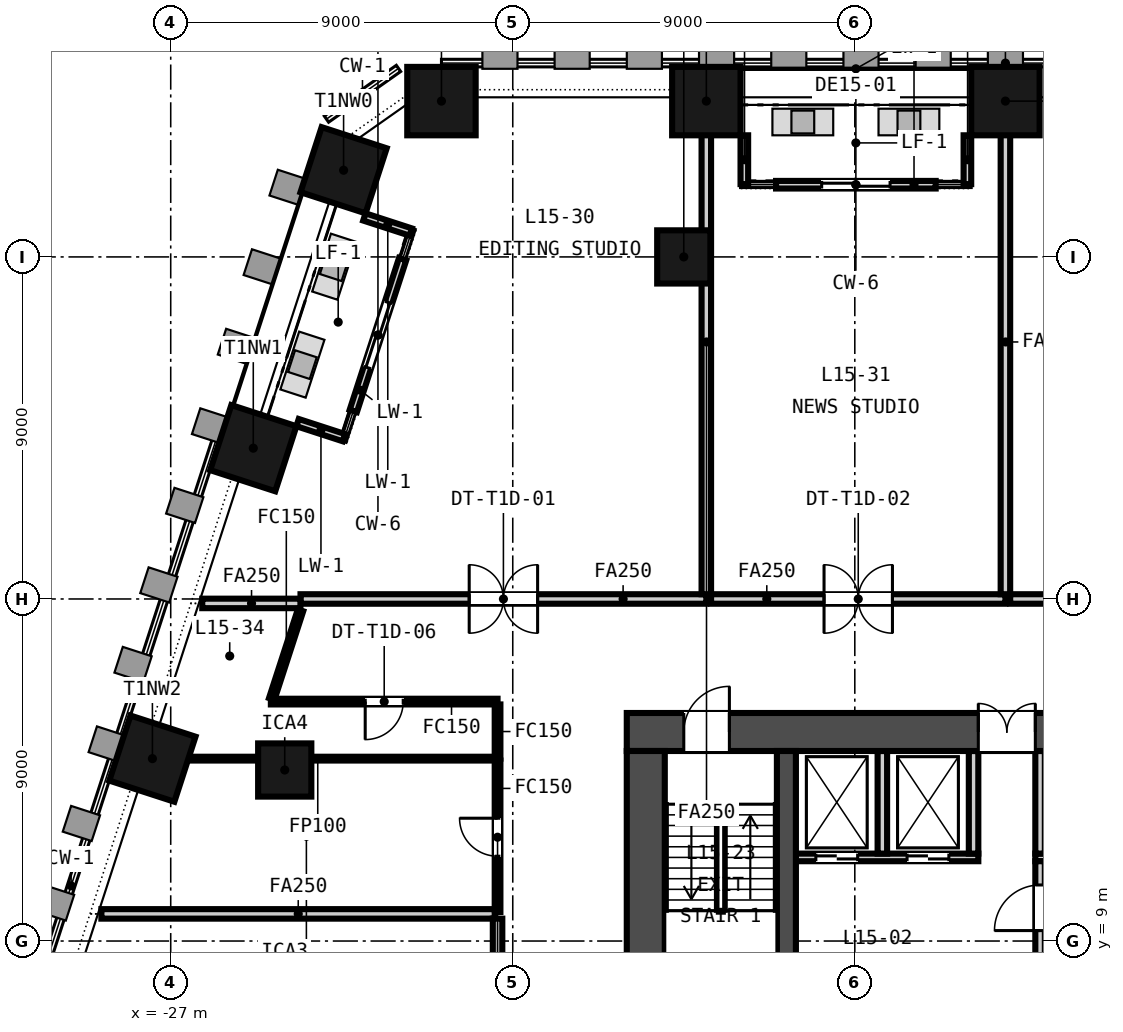
"""IFC4 building model, lengths in metres.
Left out: names, types, materials, properties, quantities, classifications, styles, units other than length and angle.
Written with IfcOpenShell. Run it as: python <this file> out.ifc"""

import sys

from ifc_helpers import new_model, si_unit, direction, frame, frame_2d, origin, origin_2d, place, context, subcontext, project, spatial, rectangle, extrude, element, fill, save


model = new_model("IFC4")
c1 = context("Model", 3, precision=1e-05, world=origin(), true_north=direction((0.0, 1.0)))
c2 = subcontext(c1, "Body", "Model", "MODEL_VIEW")
j1 = project(units=[si_unit("LENGTHUNIT", "METRE"), si_unit("PLANEANGLEUNIT", "RADIAN")], contexts=[c1])
p1 = place(None, origin())
s1 = spatial("IfcSite", under=j1, at=p1, CompositionType="ELEMENT")
p2 = place(p1, origin())
s2 = spatial("IfcBuilding", under=s1, at=p2, CompositionType="ELEMENT")
p3 = place(p2, frame((0.0, 0.0, 68.85)))
s3 = spatial("IfcBuildingStorey", under=s2, at=p3, CompositionType="ELEMENT", Elevation=68.85)
p4 = place(p3, frame((-15.0, 14.5, -0.15), z_axis=(0.0, 0.0, 1.0), x_axis=(1.0, 0.0, 0.0)))
e1 = element("IfcWall", 1, at=p4, inside=s3, PredefinedType="SOLIDWALL", context=c2, shape_type="SweptSolid", body=[
    extrude(rectangle(XDim=30.0, YDim=1.0, at=frame_2d((15.0, 0.0))), origin(), (0.0, 0.0, 1.0), 3.65),
])
p5 = place(p4, frame((9.25, 0.0, 0.15)))
e2 = element("IfcOpeningElement", 2, at=p5, cuts=e1, PredefinedType="OPENING", context=c2, shape_type="SweptSolid", body=[
    extrude(rectangle(XDim=1.5, YDim=2.1, at=frame_2d((0.75, 1.05))), frame((0.0, 0.51, 0.0), z_axis=(0.0, -1.0, 0.0), x_axis=(1.0, 0.0, 0.0)), (0.0, 0.0, 1.0), 1.02),
])
p6 = place(p4, frame((19.4, 0.0, 0.15)))
e3 = element("IfcOpeningElement", 3, at=p6, cuts=e1, PredefinedType="OPENING", context=c2, shape_type="SweptSolid", body=[
    extrude(rectangle(XDim=1.5, YDim=2.1, at=frame_2d((0.75, 1.05))), frame((0.0, 0.51, 0.0), z_axis=(0.0, -1.0, 0.0), x_axis=(1.0, 0.0, 0.0)), (0.0, 0.0, 1.0), 1.02),
])
p7 = place(p4, frame((1.5, 0.0, 0.15)))
e4 = element("IfcOpeningElement", 4, at=p7, cuts=e1, PredefinedType="OPENING", context=c2, shape_type="SweptSolid", body=[
    extrude(rectangle(XDim=1.2, YDim=2.1, at=frame_2d((0.6, 1.05))), frame((0.0, 0.51, 0.0), z_axis=(0.0, -1.0, 0.0), x_axis=(1.0, 0.0, 0.0)), (0.0, 0.0, 1.0), 1.02),
])
p8 = place(p4, frame((27.3, 0.0, 0.15)))
e5 = element("IfcOpeningElement", 5, at=p8, cuts=e1, PredefinedType="OPENING", context=c2, shape_type="SweptSolid", body=[
    extrude(rectangle(XDim=1.2, YDim=2.1, at=frame_2d((0.6, 1.05))), frame((0.0, 0.51, 0.0), z_axis=(0.0, -1.0, 0.0), x_axis=(1.0, 0.0, 0.0)), (0.0, 0.0, 1.0), 1.02),
])
p9 = place(p3, frame((-14.5, 1.0, -0.15), z_axis=(0.0, 0.0, 1.0), x_axis=(0.0, 1.0, 0.0)))
e6 = element("IfcWall", 6, at=p9, inside=s3, PredefinedType="SOLIDWALL", context=c2, shape_type="SweptSolid", body=[
    extrude(rectangle(XDim=13.0, YDim=1.0, at=frame_2d((6.5, 0.0))), origin(), (0.0, 0.0, 1.0), 3.65),
])
p10 = place(p3, frame((-10.8, 1.0, -0.15), z_axis=(0.0, 0.0, 1.0), x_axis=(0.0, 1.0, 0.0)))
e7 = element("IfcWall", 7, at=p10, inside=s3, PredefinedType="SOLIDWALL", context=c2, shape_type="SweptSolid", body=[
    extrude(rectangle(XDim=13.0, YDim=0.5, at=frame_2d((6.5, 0.0))), origin(), (0.0, 0.0, 1.0), 3.65),
])
for number, where, z_axis, x_axis in (
    (8, (-5.037, 31.1, -0.15), (0.0, 0.0, 1.0), (-1.0, 0.0, 0.0)),
    (9, (-12.907, 31.1, -0.15), (0.0, 0.0, 1.0), (-1.0, 0.0, 0.0)),
    (10, (-19.876, 31.1, -0.15), (0.0, 0.0, 1.0), (-1.0, 0.0, 0.0)),
    (11, (-22.451, 29.281, -0.15), (0.0, 0.0, 1.0), (-0.309, -0.951, 0.0)),
    (12, (-24.827, 21.968, -0.15), (0.0, 0.0, 1.0), (-0.309, -0.951, 0.0)),
    (13, (-27.482, 13.799, -0.15), (0.0, 0.0, 1.0), (-0.309, -0.951, 0.0)),
):
    element("IfcColumn", number, at=place(p3, frame(where, z_axis=z_axis, x_axis=x_axis)), inside=s3, PredefinedType="COLUMN", context=c2, shape_type="SweptSolid", body=[
        extrude(rectangle(XDim=1.8, YDim=1.8, at=origin_2d()), origin(), (0.0, 0.0, 1.0), 3.65),
    ])
for number, where, z_axis, x_axis in (
    (14, (-24.0, 13.5, -0.15), (0.0, 0.0, 1.0), (1.0, 0.0, 0.0)),
    (15, (-13.5, 27.0, -0.15), (0.0, 0.0, 1.0), (1.0, 0.0, 0.0)),
):
    element("IfcColumn", number, at=place(p3, frame(where, z_axis=z_axis, x_axis=x_axis)), inside=s3, PredefinedType="COLUMN", context=c2, shape_type="SweptSolid", body=[
        extrude(rectangle(XDim=1.4, YDim=1.4, at=origin_2d()), origin(), (0.0, 0.0, 1.0), 3.65),
    ])
p11 = place(p3, frame((-6.872, 28.9, 0.0), z_axis=(0.0, 0.0, 1.0), x_axis=(-1.0, 0.0, 0.0)))
e16 = element("IfcWall", 16, at=p11, inside=s3, PredefinedType="SOLIDWALL", context=c2, shape_type="SweptSolid", body=[
    extrude(rectangle(XDim=4.2, YDim=0.2, at=frame_2d((2.1, 0.0))), origin(), (0.0, 0.0, 1.0), 3.05),
])
p12 = place(p11, frame((1.2, 0.0, 0.0)))
e17 = element("IfcOpeningElement", 17, at=p12, cuts=e16, PredefinedType="OPENING", context=c2, shape_type="SweptSolid", body=[
    extrude(rectangle(XDim=1.8, YDim=2.4, at=frame_2d((0.9, 1.2))), frame((0.0, 0.11, 0.0), z_axis=(0.0, -1.0, 0.0), x_axis=(1.0, 0.0, 0.0)), (0.0, 0.0, 1.0), 0.22),
])
for number, where, z_axis, x_axis in (
    (18, (-6.037, 30.2, 0.0), (0.0, 0.0, 1.0), (0.0, -1.0, 0.0)),
    (19, (-11.907, 30.2, 0.0), (0.0, 0.0, 1.0), (0.0, -1.0, 0.0)),
):
    element("IfcWall", number, at=place(p3, frame(where, z_axis=z_axis, x_axis=x_axis)), inside=s3, PredefinedType="SOLIDWALL", context=c2, shape_type="SweptSolid", body=[
        extrude(rectangle(XDim=1.284, YDim=0.2, at=frame_2d((0.642, 0.0))), origin(), (0.0, 0.0, 1.0), 3.05),
    ])
p13 = place(p3, frame((-20.898, 26.942, 0.0), z_axis=(0.0, 0.0, 1.0), x_axis=(-0.30901640812, -0.951056706781, 0.0)))
e20 = element("IfcWall", 20, at=p13, inside=s3, PredefinedType="SOLIDWALL", context=c2, shape_type="SweptSolid", body=[
    extrude(rectangle(XDim=4.2, YDim=0.2, at=frame_2d((2.1, 0.0))), origin(), (0.0, 0.0, 1.0), 2.821),
])
p14 = place(p13, frame((1.2, 0.0, 0.0)))
e21 = element("IfcOpeningElement", 21, at=p14, cuts=e20, PredefinedType="OPENING", context=c2, shape_type="SweptSolid", body=[
    extrude(rectangle(XDim=1.8, YDim=2.4, at=frame_2d((0.9, 1.2))), frame((0.0, 0.11, 0.0), z_axis=(0.0, -1.0, 0.0), x_axis=(1.0, 0.0, 0.0)), (0.0, 0.0, 1.0), 0.22),
])
p15 = place(p3, frame((-21.904, 28.052, 0.0), z_axis=(0.0, 0.0, 1.0), x_axis=(0.951070391529, -0.308974287532, 0.0)))
e22 = element("IfcWall", 22, at=p15, inside=s3, PredefinedType="SOLIDWALL", context=c2, shape_type="SweptSolid", body=[
    extrude(rectangle(XDim=1.284, YDim=0.2, at=frame_2d((0.642, 0.0))), origin(), (0.0, 0.0, 1.0), 3.05),
])
p16 = place(p3, frame((-23.662, 22.641, 0.0), z_axis=(0.0, 0.0, 1.0), x_axis=(0.951052235057, -0.30903017036, 0.0)))
e23 = element("IfcWall", 23, at=p16, inside=s3, PredefinedType="SOLIDWALL", context=c2, shape_type="SweptSolid", body=[
    extrude(rectangle(XDim=1.284, YDim=0.2, at=frame_2d((0.642, 0.0))), origin(), (0.0, 0.0, 1.0), 3.05),
])
p17 = place(p3, frame((-10.55, 11.2, 0.0), z_axis=(0.0, 0.0, 1.0), x_axis=(1.0, 0.0, 0.0)))
e24 = element("IfcWall", 24, at=p17, inside=s3, PredefinedType="PARTITIONING", context=c2, shape_type="SweptSolid", body=[
    extrude(rectangle(XDim=4.8, YDim=0.2, at=frame_2d((2.4, 0.0))), origin(), (0.0, 0.0, 1.0), 3.5),
])
p18 = place(p17, frame((0.525, 0.0, 0.0)))
e25 = element("IfcOpeningElement", 25, at=p18, cuts=e24, PredefinedType="OPENING", context=c2, shape_type="SweptSolid", body=[
    extrude(rectangle(XDim=1.1, YDim=2.1, at=frame_2d((0.55, 1.05))), frame((0.0, 0.11, 0.0), z_axis=(0.0, -1.0, 0.0), x_axis=(1.0, 0.0, 0.0)), (0.0, 0.0, 1.0), 0.22),
])
p19 = place(p17, frame((2.925, 0.0, 0.0)))
e26 = element("IfcOpeningElement", 26, at=p19, cuts=e24, PredefinedType="OPENING", context=c2, shape_type="SweptSolid", body=[
    extrude(rectangle(XDim=1.1, YDim=2.1, at=frame_2d((0.55, 1.05))), frame((0.0, 0.11, 0.0), z_axis=(0.0, -1.0, 0.0), x_axis=(1.0, 0.0, 0.0)), (0.0, 0.0, 1.0), 0.22),
])
p20 = place(p3, frame((-4.25, 11.2, 0.0), z_axis=(0.0, 0.0, 1.0), x_axis=(1.0, 0.0, 0.0)))
e27 = element("IfcWall", 27, at=p20, inside=s3, PredefinedType="PARTITIONING", context=c2, shape_type="SweptSolid", body=[
    extrude(rectangle(XDim=8.65, YDim=0.2, at=frame_2d((4.325, 0.0))), origin(), (0.0, 0.0, 1.0), 3.5),
])
p21 = place(p20, frame((0.825, 0.0, 0.0)))
e28 = element("IfcOpeningElement", 28, at=p21, cuts=e27, PredefinedType="OPENING", context=c2, shape_type="SweptSolid", body=[
    extrude(rectangle(XDim=1.4, YDim=2.1, at=frame_2d((0.7, 1.05))), frame((0.0, 0.11, 0.0), z_axis=(0.0, -1.0, 0.0), x_axis=(1.0, 0.0, 0.0)), (0.0, 0.0, 1.0), 0.22),
])
p22 = place(p20, frame((3.625, 0.0, 0.0)))
e29 = element("IfcOpeningElement", 29, at=p22, cuts=e27, PredefinedType="OPENING", context=c2, shape_type="SweptSolid", body=[
    extrude(rectangle(XDim=1.4, YDim=2.1, at=frame_2d((0.7, 1.05))), frame((0.0, 0.11, 0.0), z_axis=(0.0, -1.0, 0.0), x_axis=(1.0, 0.0, 0.0)), (0.0, 0.0, 1.0), 0.22),
])
p23 = place(p3, frame((-4.125, 6.15, 0.0), z_axis=(0.0, 0.0, 1.0), x_axis=(0.0, 1.0, 0.0)))
e30 = element("IfcWall", 30, at=p23, inside=s3, PredefinedType="PARTITIONING", context=c2, shape_type="SweptSolid", body=[
    extrude(rectangle(XDim=4.95, YDim=0.25, at=frame_2d((2.475, 0.0))), origin(), (0.0, 0.0, 1.0), 3.5),
])
p24 = place(p23, frame((3.125, 0.0, 0.0)))
e31 = element("IfcOpeningElement", 31, at=p24, cuts=e30, PredefinedType="OPENING", context=c2, shape_type="SweptSolid", body=[
    extrude(rectangle(XDim=1.2, YDim=2.1, at=frame_2d((0.6, 1.05))), frame((0.0, 0.135, 0.0), z_axis=(0.0, -1.0, 0.0), x_axis=(1.0, 0.0, 0.0)), (0.0, 0.0, 1.0), 0.27),
])
for number, where, z_axis, x_axis in (
    (32, (-8.275, 11.3, 0.0), (0.0, 0.0, 1.0), (0.0, 1.0, 0.0)),
    (33, (-5.875, 11.3, 0.0), (0.0, 0.0, 1.0), (0.0, 1.0, 0.0)),
    (34, (-4.125, 11.3, 0.0), (0.0, 0.0, 1.0), (0.0, 1.0, 0.0)),
):
    element("IfcWall", number, at=place(p3, frame(where, z_axis=z_axis, x_axis=x_axis)), inside=s3, PredefinedType="PARTITIONING", context=c2, shape_type="SweptSolid", body=[
        extrude(rectangle(XDim=2.7, YDim=0.25, at=frame_2d((1.35, 0.0))), origin(), (0.0, 0.0, 1.0), 3.5),
    ])
p25 = place(p3, frame((-18.4, 15.3, 0.0), z_axis=(0.0, 0.0, 1.0), x_axis=(-1.0, 0.0, 0.0)))
e35 = element("IfcWall", 35, at=p25, inside=s3, PredefinedType="PARTITIONING", context=c2, shape_type="SweptSolid", body=[
    extrude(rectangle(XDim=5.965, YDim=0.15, at=frame_2d((2.982, 0.0))), origin(), (0.0, 0.0, 1.0), 2.741),
])
p26 = place(p25, frame((2.482, 0.0, 0.0)))
e36 = element("IfcOpeningElement", 36, at=p26, cuts=e35, PredefinedType="OPENING", context=c2, shape_type="SweptSolid", body=[
    extrude(rectangle(XDim=1.0, YDim=2.1, at=frame_2d((0.5, 1.05))), frame((0.0, 0.085, 0.0), z_axis=(0.0, -1.0, 0.0), x_axis=(1.0, 0.0, 0.0)), (0.0, 0.0, 1.0), 0.17),
])
p27 = place(p3, frame((-23.585, 18.0, 0.0), z_axis=(0.0, 0.0, 1.0), x_axis=(1.0, 0.0, 0.0)))
e37 = element("IfcWall", 37, at=p27, inside=s3, PredefinedType="PARTITIONING", context=c2, shape_type="SweptSolid", body=[
    extrude(rectangle(XDim=10.678, YDim=0.25, at=frame_2d((5.339, 0.0))), origin(), (0.0, 0.0, 1.0), 2.741),
])
p28 = place(p27, frame((4.439, 0.0, 0.0)))
e38 = element("IfcOpeningElement", 38, at=p28, cuts=e37, PredefinedType="OPENING", context=c2, shape_type="SweptSolid", body=[
    extrude(rectangle(XDim=1.8, YDim=2.1, at=frame_2d((0.9, 1.05))), frame((0.0, 0.135, 0.0), z_axis=(0.0, -1.0, 0.0), x_axis=(1.0, 0.0, 0.0)), (0.0, 0.0, 1.0), 0.27),
])
p29 = place(p3, frame((-12.907, 18.125, 0.0), z_axis=(0.0, 0.0, 1.0), x_axis=(0.0, 1.0, 0.0)))
e39 = element("IfcWall", 39, at=p29, inside=s3, PredefinedType="PARTITIONING", context=c2, shape_type="SweptSolid", body=[
    extrude(rectangle(XDim=13.275, YDim=0.25, at=frame_2d((6.637, 0.0))), origin(), (0.0, 0.0, 1.0), 2.741),
])
p30 = place(p3, frame((-26.17, 17.883, 0.0), z_axis=(0.0, 0.0, 1.0), x_axis=(1.0, 0.0, 0.0)))
e40 = element("IfcWall", 40, at=p30, inside=s3, PredefinedType="PARTITIONING", context=c2, shape_type="SweptSolid", body=[
    extrude(rectangle(XDim=2.583, YDim=0.25, at=frame_2d((1.292, 0.0))), origin(), (0.0, 0.0, 1.0), 2.741),
])
p31 = place(p3, frame((-12.782, 18.0, 0.0), z_axis=(0.0, 0.0, 1.0), x_axis=(1.0, 0.0, 0.0)))
e41 = element("IfcWall", 41, at=p31, inside=s3, PredefinedType="PARTITIONING", context=c2, shape_type="SweptSolid", body=[
    extrude(rectangle(XDim=7.745, YDim=0.25, at=frame_2d((3.873, 0.0))), origin(), (0.0, 0.0, 1.0), 2.741),
])
p32 = place(p31, frame((2.972, 0.0, 0.0)))
e42 = element("IfcOpeningElement", 42, at=p32, cuts=e41, PredefinedType="OPENING", context=c2, shape_type="SweptSolid", body=[
    extrude(rectangle(XDim=1.8, YDim=2.1, at=frame_2d((0.9, 1.05))), frame((0.0, 0.135, 0.0), z_axis=(0.0, -1.0, 0.0), x_axis=(1.0, 0.0, 0.0)), (0.0, 0.0, 1.0), 0.27),
])
p33 = place(p3, frame((-5.037, 18.125, 0.0), z_axis=(0.0, 0.0, 1.0), x_axis=(0.0, 1.0, 0.0)))
e43 = element("IfcWall", 43, at=p33, inside=s3, PredefinedType="PARTITIONING", context=c2, shape_type="SweptSolid", body=[
    extrude(rectangle(XDim=13.275, YDim=0.25, at=frame_2d((6.637, 0.0))), origin(), (0.0, 0.0, 1.0), 2.741),
])
p34 = place(p3, frame((-4.912, 18.0, 0.0), z_axis=(0.0, 0.0, 1.0), x_axis=(1.0, 0.0, 0.0)))
e44 = element("IfcWall", 44, at=p34, inside=s3, PredefinedType="PARTITIONING", context=c2, shape_type="SweptSolid", body=[
    extrude(rectangle(XDim=13.512, YDim=0.25, at=frame_2d((6.756, 0.0))), origin(), (0.0, 0.0, 1.0), 2.741),
])
p35 = place(p34, frame((5.856, 0.0, 0.0)))
e45 = element("IfcOpeningElement", 45, at=p35, cuts=e44, PredefinedType="OPENING", context=c2, shape_type="SweptSolid", body=[
    extrude(rectangle(XDim=1.8, YDim=2.1, at=frame_2d((0.9, 1.05))), frame((0.0, 0.135, 0.0), z_axis=(0.0, -1.0, 0.0), x_axis=(1.0, 0.0, 0.0)), (0.0, 0.0, 1.0), 0.27),
])
p36 = place(p3, frame((-24.342, 15.371, 0.0), z_axis=(0.0, 0.0, 1.0), x_axis=(0.309099599888, 0.951029672171, 0.0)))
e46 = element("IfcWall", 46, at=p36, inside=s3, PredefinedType="PARTITIONING", context=c2, shape_type="SweptSolid", body=[
    extrude(rectangle(XDim=2.448, YDim=0.15, at=frame_2d((1.224, 0.0))), origin(), (0.0, 0.0, 1.0), 2.741),
])
p37 = place(p3, frame((-18.4, 13.799, 0.0), z_axis=(0.0, 0.0, 1.0), x_axis=(0.0, 1.0, 0.0)))
e47 = element("IfcWall", 47, at=p37, inside=s3, PredefinedType="PARTITIONING", context=c2, shape_type="SweptSolid", body=[
    extrude(rectangle(XDim=1.426, YDim=0.15, at=frame_2d((0.713, 0.0))), origin(), (0.0, 0.0, 1.0), 2.741),
])
p38 = place(p3, frame((-27.797, 13.799, 0.0), z_axis=(0.0, 0.0, 1.0), x_axis=(1.0, 0.0, 0.0)))
e48 = element("IfcWall", 48, at=p38, inside=s3, PredefinedType="PARTITIONING", context=c2, shape_type="SweptSolid", body=[
    extrude(rectangle(XDim=9.322, YDim=0.1, at=frame_2d((4.661, 0.0))), origin(), (0.0, 0.0, 1.0), 2.741),
])
p39 = place(p3, frame((-18.4, 9.764, 0.0), z_axis=(0.0, 0.0, 1.0), x_axis=(0.0, 1.0, 0.0)))
e49 = element("IfcWall", 49, at=p39, inside=s3, PredefinedType="PARTITIONING", context=c2, shape_type="SweptSolid", body=[
    extrude(rectangle(XDim=3.985, YDim=0.15, at=frame_2d((1.993, 0.0))), origin(), (0.0, 0.0, 1.0), 2.741),
])
p40 = place(p39, frame((1.468, 0.0, 0.0)))
e50 = element("IfcOpeningElement", 50, at=p40, cuts=e49, PredefinedType="OPENING", context=c2, shape_type="SweptSolid", body=[
    extrude(rectangle(XDim=1.0, YDim=2.1, at=frame_2d((0.5, 1.05))), frame((0.0, 0.085, 0.0), z_axis=(0.0, -1.0, 0.0), x_axis=(1.0, 0.0, 0.0)), (0.0, 0.0, 1.0), 0.17),
])
p41 = place(p3, frame((-28.824, 9.714, 0.0), z_axis=(0.0, 0.0, 1.0), x_axis=(1.0, 0.0, 0.0)))
e51 = element("IfcWall", 51, at=p41, inside=s3, PredefinedType="PARTITIONING", context=c2, shape_type="SweptSolid", body=[
    extrude(rectangle(XDim=10.349, YDim=0.25, at=frame_2d((5.174, 0.0))), origin(), (0.0, 0.0, 1.0), 2.741),
])
p42 = place(p3, frame((-18.4, 4.325, 0.0), z_axis=(0.0, 0.0, 1.0), x_axis=(0.0, 1.0, 0.0)))
e52 = element("IfcWall", 52, at=p42, inside=s3, PredefinedType="PARTITIONING", context=c2, shape_type="SweptSolid", body=[
    extrude(rectangle(XDim=5.264, YDim=0.25, at=frame_2d((2.632, 0.0))), origin(), (0.0, 0.0, 1.0), 2.741),
])
p43 = place(p12, origin())
e53 = element("IfcDoor", 53, at=p43, inside=s3, OperationType="SINGLE_SWING_LEFT", PredefinedType="DOOR", context=c2, shape_type="SweptSolid", body=[
    extrude(rectangle(XDim=1.8, YDim=2.4, at=frame_2d((0.9, 1.2))), frame((0.0, 0.025, 0.0), z_axis=(0.0, -1.0, 0.0), x_axis=(1.0, 0.0, 0.0)), (0.0, 0.0, 1.0), 0.05),
])
fill(e17, e53)
p44 = place(p14, origin())
e54 = element("IfcDoor", 54, at=p44, inside=s3, OperationType="SINGLE_SWING_LEFT", PredefinedType="DOOR", context=c2, shape_type="SweptSolid", body=[
    extrude(rectangle(XDim=1.8, YDim=2.4, at=frame_2d((0.9, 1.2))), frame((0.0, 0.025, 0.0), z_axis=(0.0, -1.0, 0.0), x_axis=(1.0, 0.0, 0.0)), (0.0, 0.0, 1.0), 0.05),
])
fill(e21, e54)
p45 = place(p24, origin())
e55 = element("IfcDoor", 55, at=p45, inside=s3, OperationType="SINGLE_SWING_LEFT", PredefinedType="DOOR", context=c2, shape_type="SweptSolid", body=[
    extrude(rectangle(XDim=1.2, YDim=2.1, at=frame_2d((0.6, 1.05))), frame((0.0, 0.025, 0.0), z_axis=(0.0, -1.0, 0.0), x_axis=(1.0, 0.0, 0.0)), (0.0, 0.0, 1.0), 0.05),
])
fill(e31, e55)
p46 = place(p18, origin())
e56 = element("IfcDoor", 56, at=p46, inside=s3, OperationType="DOUBLE_DOOR_SLIDING", PredefinedType="DOOR", context=c2, shape_type="SweptSolid", body=[
    extrude(rectangle(XDim=1.1, YDim=2.1, at=frame_2d((0.55, 1.05))), frame((0.0, 0.025, 0.0), z_axis=(0.0, -1.0, 0.0), x_axis=(1.0, 0.0, 0.0)), (0.0, 0.0, 1.0), 0.05),
])
fill(e25, e56)
p47 = place(p19, origin())
e57 = element("IfcDoor", 57, at=p47, inside=s3, OperationType="DOUBLE_DOOR_SLIDING", PredefinedType="DOOR", context=c2, shape_type="SweptSolid", body=[
    extrude(rectangle(XDim=1.1, YDim=2.1, at=frame_2d((0.55, 1.05))), frame((0.0, 0.025, 0.0), z_axis=(0.0, -1.0, 0.0), x_axis=(1.0, 0.0, 0.0)), (0.0, 0.0, 1.0), 0.05),
])
fill(e26, e57)
p48 = place(p5, origin())
e58 = element("IfcDoor", 58, at=p48, inside=s3, OperationType="DOUBLE_DOOR_SINGLE_SWING", PredefinedType="DOOR", context=c2, shape_type="SweptSolid", body=[
    extrude(rectangle(XDim=1.5, YDim=2.1, at=frame_2d((0.75, 1.05))), frame((0.0, 0.025, 0.0), z_axis=(0.0, -1.0, 0.0), x_axis=(1.0, 0.0, 0.0)), (0.0, 0.0, 1.0), 0.05),
])
fill(e2, e58)
p49 = place(p7, origin())
e59 = element("IfcDoor", 59, at=p49, inside=s3, OperationType="SINGLE_SWING_RIGHT", PredefinedType="DOOR", context=c2, shape_type="SweptSolid", body=[
    extrude(rectangle(XDim=1.2, YDim=2.1, at=frame_2d((0.6, 1.05))), frame((0.0, 0.025, 0.0), z_axis=(0.0, -1.0, 0.0), x_axis=(1.0, 0.0, 0.0)), (0.0, 0.0, 1.0), 0.05),
])
fill(e4, e59)
p50 = place(p28, origin())
e60 = element("IfcDoor", 60, at=p50, inside=s3, OperationType="DOUBLE_DOOR_DOUBLE_SWING", PredefinedType="DOOR", context=c2, shape_type="SweptSolid", body=[
    extrude(rectangle(XDim=1.8, YDim=2.1, at=frame_2d((0.9, 1.05))), frame((0.0, 0.025, 0.0), z_axis=(0.0, -1.0, 0.0), x_axis=(1.0, 0.0, 0.0)), (0.0, 0.0, 1.0), 0.05),
])
fill(e38, e60)
p51 = place(p32, origin())
e61 = element("IfcDoor", 61, at=p51, inside=s3, OperationType="DOUBLE_DOOR_DOUBLE_SWING", PredefinedType="DOOR", context=c2, shape_type="SweptSolid", body=[
    extrude(rectangle(XDim=1.8, YDim=2.1, at=frame_2d((0.9, 1.05))), frame((0.0, 0.025, 0.0), z_axis=(0.0, -1.0, 0.0), x_axis=(1.0, 0.0, 0.0)), (0.0, 0.0, 1.0), 0.05),
])
fill(e42, e61)
p52 = place(p26, origin())
e62 = element("IfcDoor", 62, at=p52, inside=s3, OperationType="SINGLE_SWING_RIGHT", PredefinedType="DOOR", context=c2, shape_type="SweptSolid", body=[
    extrude(rectangle(XDim=1.0, YDim=2.1, at=frame_2d((0.5, 1.05))), frame((0.0, 0.025, 0.0), z_axis=(0.0, -1.0, 0.0), x_axis=(1.0, 0.0, 0.0)), (0.0, 0.0, 1.0), 0.05),
])
fill(e36, e62)
p53 = place(p40, origin())
e63 = element("IfcDoor", 63, at=p53, inside=s3, OperationType="SINGLE_SWING_RIGHT", PredefinedType="DOOR", context=c2, shape_type="SweptSolid", body=[
    extrude(rectangle(XDim=1.0, YDim=2.1, at=frame_2d((0.5, 1.05))), frame((0.0, 0.025, 0.0), z_axis=(0.0, -1.0, 0.0), x_axis=(1.0, 0.0, 0.0)), (0.0, 0.0, 1.0), 0.05),
])
fill(e50, e63)
save(model, sys.argv[1])
